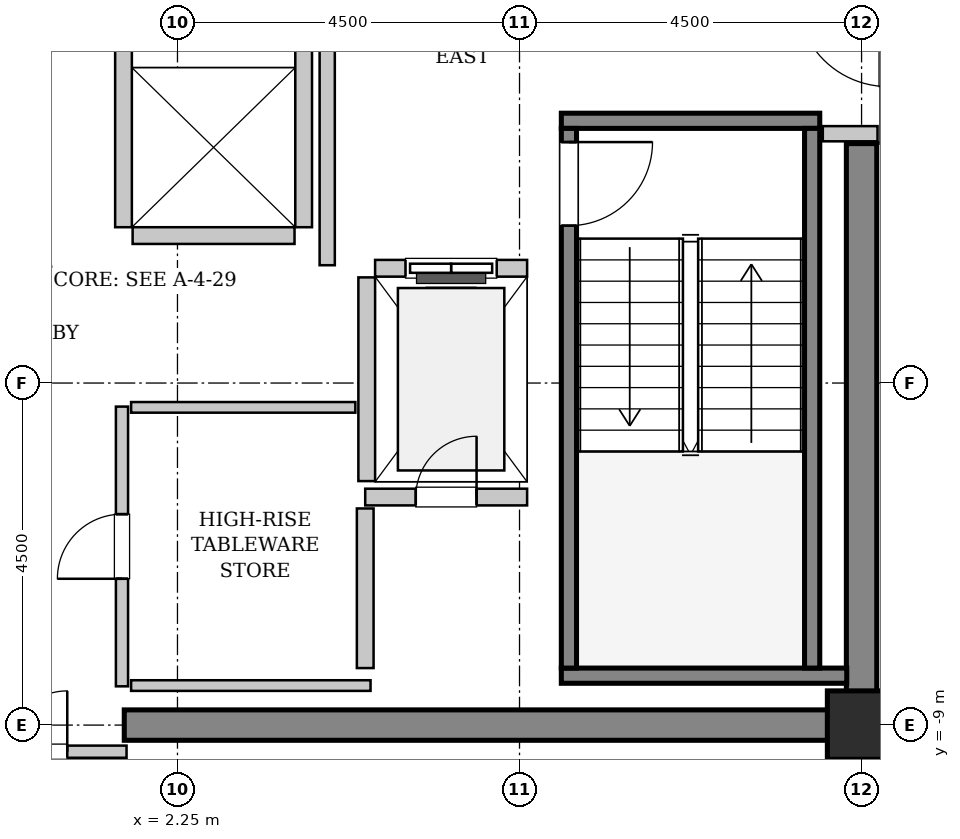
"""IFC4 building model, lengths in metres.
Left out: names, types, materials, properties, quantities, classifications, styles, units other than length and angle.
Written with IfcOpenShell. Run it as: python <this file> out.ifc"""

import sys

from ifc_helpers import new_model, si_unit, direction, frame, frame_2d, origin, origin_2d, place, context, subcontext, project, spatial, rectangle, extrude, source, transform, mapped, element, fill, save


model = new_model("IFC4")
c1 = context("Model", 3, precision=1e-05, world=origin(), true_north=direction((0.0, 1.0)))
c2 = subcontext(c1, "Body", "Model", "MODEL_VIEW")
j1 = project(units=[si_unit("LENGTHUNIT", "METRE"), si_unit("PLANEANGLEUNIT", "RADIAN")], contexts=[c1])
p1 = place(None, origin())
s1 = spatial("IfcSite", under=j1, at=p1, CompositionType="ELEMENT")
p2 = place(p1, origin())
s2 = spatial("IfcBuilding", under=s1, at=p2, CompositionType="ELEMENT")
p3 = place(p2, frame((0.0, 0.0, 333.8)))
s3 = spatial("IfcBuildingStorey", under=s2, at=p3, CompositionType="ELEMENT", Elevation=333.8)
m1 = source(origin(), c2, "Body", "SweptSolid", [
    extrude(rectangle(XDim=9.9, YDim=0.4, at=frame_2d((4.95, 0.0))), origin(), (0.0, 0.0, 1.0), 3.8),
])
p4 = place(p3, frame((1.55, -9.0, 0.0), z_axis=(0.0, 0.0, 1.0), x_axis=(1.0, 0.0, 0.0)))
e1 = element("IfcWall", 1, at=p4, inside=s3, PredefinedType="SHEAR", context=c2, shape_type="MappedRepresentation", body=[
    mapped(m1, transform((0.0, 0.0, 0.0), x_axis=(1.0, 0.0, 0.0), y_axis=(0.0, 1.0, 0.0), z_axis=(0.0, 0.0, 1.0), scale=1.0)),
])
m2 = source(origin(), c2, "Body", "SweptSolid", [
    extrude(rectangle(XDim=7.45, YDim=0.4, at=frame_2d((3.725, 0.0))), origin(), (0.0, 0.0, 1.0), 3.8),
])
p5 = place(p3, frame((11.25, -8.8, 0.0), z_axis=(0.0, 0.0, 1.0), x_axis=(0.0, 1.0, 0.0)))
e2 = element("IfcWall", 2, at=p5, inside=s3, PredefinedType="SHEAR", context=c2, shape_type="MappedRepresentation", body=[
    mapped(m2, transform((0.0, 0.0, 0.0), x_axis=(1.0, 0.0, 0.0), y_axis=(0.0, 1.0, 0.0), z_axis=(0.0, 0.0, 1.0), scale=1.0)),
])
m3 = source(origin(), c2, "Body", "SweptSolid", [
    extrude(rectangle(XDim=0.9, YDim=0.9, at=origin_2d()), origin(), (0.0, 0.0, 1.0), 3.8),
])
p6 = place(p3, frame((11.25, -9.0, 0.0), z_axis=(0.0, 0.0, 1.0), x_axis=(1.0, 0.0, 0.0)))
e3 = element("IfcColumn", 3, at=p6, inside=s3, PredefinedType="COLUMN", context=c2, shape_type="MappedRepresentation", body=[
    mapped(m3, transform((0.0, 0.0, 0.0), x_axis=(1.0, 0.0, 0.0), y_axis=(0.0, 1.0, 0.0), z_axis=(0.0, 0.0, 1.0), scale=1.0)),
])
m4 = source(origin(), c2, "Body", "SweptSolid", [
    extrude(rectangle(XDim=3.4, YDim=0.2, at=frame_2d((1.7, 0.0))), origin(), (0.0, 0.0, 1.0), 3.8),
])
p7 = place(p3, frame((7.3, -1.05, 0.0), z_axis=(0.0, 0.0, 1.0), x_axis=(1.0, 0.0, 0.0)))
e4 = element("IfcWall", 4, at=p7, inside=s3, PredefinedType="SOLIDWALL", context=c2, shape_type="MappedRepresentation", body=[
    mapped(m4, transform((0.0, 0.0, 0.0), x_axis=(1.0, 0.0, 0.0), y_axis=(0.0, 1.0, 0.0), z_axis=(0.0, 0.0, 1.0), scale=1.0)),
])
m5 = source(origin(), c2, "Body", "SweptSolid", [
    extrude(rectangle(XDim=3.755, YDim=0.2, at=frame_2d((1.877, 0.0))), origin(), (0.0, 0.0, 1.0), 3.8),
])
p8 = place(p3, frame((7.3, -8.35, 0.0), z_axis=(0.0, 0.0, 1.0), x_axis=(1.0, 0.0, 0.0)))
e5 = element("IfcWall", 5, at=p8, inside=s3, PredefinedType="SOLIDWALL", context=c2, shape_type="MappedRepresentation", body=[
    mapped(m5, transform((0.0, 0.0, 0.0), x_axis=(1.0, 0.0, 0.0), y_axis=(0.0, 1.0, 0.0), z_axis=(0.0, 0.0, 1.0), scale=1.0)),
])
m6 = source(origin(), c2, "Body", "SweptSolid", [
    extrude(rectangle(XDim=7.1, YDim=0.2, at=frame_2d((3.55, 0.0))), origin(), (0.0, 0.0, 1.0), 3.8),
])
p9 = place(p3, frame((7.4, -1.15, 0.0), z_axis=(0.0, 0.0, 1.0), x_axis=(0.0, -1.0, 0.0)))
e6 = element("IfcWall", 6, at=p9, inside=s3, PredefinedType="SOLIDWALL", context=c2, shape_type="MappedRepresentation", body=[
    mapped(m6, transform((0.0, 0.0, 0.0), x_axis=(1.0, 0.0, 0.0), y_axis=(0.0, 1.0, 0.0), z_axis=(0.0, 0.0, 1.0), scale=1.0)),
])
p10 = place(p9, frame((0.18, 0.0, 0.0)))
e7 = element("IfcOpeningElement", 7, at=p10, cuts=e6, PredefinedType="OPENING", context=c2, shape_type="SweptSolid", body=[
    extrude(rectangle(XDim=1.1, YDim=2.15, at=frame_2d((0.55, 1.075))), frame((0.0, 0.11, 0.0), z_axis=(0.0, -1.0, 0.0), x_axis=(1.0, 0.0, 0.0)), (0.0, 0.0, 1.0), 0.22),
])
p11 = place(p3, frame((10.6, -1.15, 0.0), z_axis=(0.0, 0.0, 1.0), x_axis=(0.0, -1.0, 0.0)))
e8 = element("IfcWall", 8, at=p11, inside=s3, PredefinedType="SOLIDWALL", context=c2, shape_type="MappedRepresentation", body=[
    mapped(m6, transform((0.0, 0.0, 0.0), x_axis=(1.0, 0.0, 0.0), y_axis=(0.0, 1.0, 0.0), z_axis=(0.0, 0.0, 1.0), scale=1.0)),
])
m7 = source(origin(), c2, "Body", "SweptSolid", [
    extrude(rectangle(XDim=2.0, YDim=0.22, at=frame_2d((1.0, 0.0))), origin(), (0.0, 0.0, 1.0), 3.535),
])
p12 = place(p3, frame((6.85, -2.99, 0.0), z_axis=(0.0, 0.0, 1.0), x_axis=(-1.0, 0.0, 0.0)))
e9 = element("IfcWall", 9, at=p12, inside=s3, PredefinedType="SOLIDWALL", context=c2, shape_type="MappedRepresentation", body=[
    mapped(m7, transform((0.0, 0.0, 0.0), x_axis=(1.0, 0.0, 0.0), y_axis=(0.0, 1.0, 0.0), z_axis=(0.0, 0.0, 1.0), scale=1.0)),
])
p13 = place(p12, frame((0.4, 0.0, 0.0)))
e10 = element("IfcOpeningElement", 10, at=p13, cuts=e9, PredefinedType="OPENING", context=c2, shape_type="SweptSolid", body=[
    extrude(rectangle(XDim=1.2, YDim=2.2, at=frame_2d((0.6, 1.1))), frame((0.0, 0.12, 0.0), z_axis=(0.0, -1.0, 0.0), x_axis=(1.0, 0.0, 0.0)), (0.0, 0.0, 1.0), 0.24),
])
m8 = source(origin(), c2, "Body", "SweptSolid", [
    extrude(rectangle(XDim=2.68, YDim=0.22, at=frame_2d((1.34, 0.0))), origin(), (0.0, 0.0, 1.0), 3.535),
])
p14 = place(p3, frame((4.74, -3.11, 0.0), z_axis=(0.0, 0.0, 1.0), x_axis=(0.0, -1.0, 0.0)))
e11 = element("IfcWall", 11, at=p14, inside=s3, PredefinedType="SOLIDWALL", context=c2, shape_type="MappedRepresentation", body=[
    mapped(m8, transform((0.0, 0.0, 0.0), x_axis=(1.0, 0.0, 0.0), y_axis=(0.0, 1.0, 0.0), z_axis=(0.0, 0.0, 1.0), scale=1.0)),
])
m9 = source(origin(), c2, "Body", "SweptSolid", [
    extrude(rectangle(XDim=4.9, YDim=0.22, at=frame_2d((2.45, 0.0))), origin(), (0.0, 0.0, 1.0), 3.535),
])
for number, where, z_axis, x_axis in (
    (12, (1.54, 2.45, 0.0), (0.0, 0.0, 1.0), (0.0, -1.0, 0.0)),
    (13, (3.91, -2.45, 0.0), (0.0, 0.0, 1.0), (0.0, 1.0, 0.0)),
):
    element("IfcWall", number, at=place(p3, frame(where, z_axis=z_axis, x_axis=x_axis)), inside=s3, PredefinedType="SOLIDWALL", context=c2, shape_type="MappedRepresentation", body=[
        mapped(m9, transform((0.0, 0.0, 0.0), x_axis=(1.0, 0.0, 0.0), y_axis=(0.0, 1.0, 0.0), z_axis=(0.0, 0.0, 1.0), scale=1.0)),
    ])
m10 = source(origin(), c2, "Body", "SweptSolid", [
    extrude(rectangle(XDim=2.13, YDim=0.22, at=frame_2d((1.065, 0.0))), origin(), (0.0, 0.0, 1.0), 3.535),
])
p15 = place(p3, frame((1.66, -2.56, 0.0), z_axis=(0.0, 0.0, 1.0), x_axis=(1.0, 0.0, 0.0)))
e14 = element("IfcWall", 14, at=p15, inside=s3, PredefinedType="SOLIDWALL", context=c2, shape_type="MappedRepresentation", body=[
    mapped(m10, transform((0.0, 0.0, 0.0), x_axis=(1.0, 0.0, 0.0), y_axis=(0.0, 1.0, 0.0), z_axis=(0.0, 0.0, 1.0), scale=1.0)),
])
p16 = place(p3, frame((4.72, -6.0, 0.0), z_axis=(0.0, 0.0, 1.0), x_axis=(1.0, 0.0, 0.0)))
e15 = element("IfcWall", 15, at=p16, inside=s3, PredefinedType="SOLIDWALL", context=c2, shape_type="MappedRepresentation", body=[
    mapped(m10, transform((0.0, 0.0, 0.0), x_axis=(1.0, 0.0, 0.0), y_axis=(0.0, 1.0, 0.0), z_axis=(0.0, 0.0, 1.0), scale=1.0)),
])
p17 = place(p16, frame((0.665, 0.0, 0.0)))
e16 = element("IfcOpeningElement", 16, at=p17, cuts=e15, PredefinedType="OPENING", context=c2, shape_type="SweptSolid", body=[
    extrude(rectangle(XDim=0.8, YDim=2.0, at=frame_2d((0.4, 1.0))), frame((0.0, 0.12, 0.0), z_axis=(0.0, -1.0, 0.0), x_axis=(1.0, 0.0, 0.0)), (0.0, 0.0, 1.0), 0.24),
])
m11 = source(origin(), c2, "Body", "SweptSolid", [
    extrude(rectangle(XDim=2.1, YDim=0.22, at=frame_2d((1.05, 0.0))), origin(), (0.0, 0.0, 1.0), 3.535),
])
p18 = place(p3, frame((4.72, -8.25, 0.0), z_axis=(0.0, 0.0, 1.0), x_axis=(0.0, 1.0, 0.0)))
e17 = element("IfcWall", 17, at=p18, inside=s3, PredefinedType="SOLIDWALL", context=c2, shape_type="MappedRepresentation", body=[
    mapped(m11, transform((0.0, 0.0, 0.0), x_axis=(1.0, 0.0, 0.0), y_axis=(0.0, 1.0, 0.0), z_axis=(0.0, 0.0, 1.0), scale=1.0)),
])
m12 = source(origin(), c2, "Body", "SweptSolid", [
    extrude(rectangle(XDim=5.9, YDim=0.2, at=frame_2d((2.95, 0.0))), origin(), (0.0, 0.0, 1.0), 3.535),
])
p19 = place(p3, frame((4.22, -2.95, 0.0), z_axis=(0.0, 0.0, 1.0), x_axis=(0.0, 1.0, 0.0)))
e18 = element("IfcWall", 18, at=p19, inside=s3, PredefinedType="PARTITIONING", context=c2, shape_type="MappedRepresentation", body=[
    mapped(m12, transform((0.0, 0.0, 0.0), x_axis=(1.0, 0.0, 0.0), y_axis=(0.0, 1.0, 0.0), z_axis=(0.0, 0.0, 1.0), scale=1.0)),
])
m13 = source(origin(), c2, "Body", "SweptSolid", [
    extrude(rectangle(XDim=0.72, YDim=0.2, at=frame_2d((0.36, 0.0))), origin(), (0.0, 0.0, 1.0), 3.535),
])
p20 = place(p3, frame((10.74, -1.22, 0.0), z_axis=(0.0, 0.0, 1.0), x_axis=(1.0, 0.0, 0.0)))
e19 = element("IfcWall", 19, at=p20, inside=s3, PredefinedType="PARTITIONING", context=c2, shape_type="MappedRepresentation", body=[
    mapped(m13, transform((0.0, 0.0, 0.0), x_axis=(1.0, 0.0, 0.0), y_axis=(0.0, 1.0, 0.0), z_axis=(0.0, 0.0, 1.0), scale=1.0)),
])
m14 = source(origin(), c2, "Body", "SweptSolid", [
    extrude(rectangle(XDim=3.16, YDim=0.16, at=frame_2d((1.58, 0.0))), origin(), (0.0, 0.0, 1.0), 2.625),
])
p21 = place(p3, frame((-1.58, -9.35, 0.0), z_axis=(0.0, 0.0, 1.0), x_axis=(1.0, 0.0, 0.0)))
e20 = element("IfcWall", 20, at=p21, inside=s3, PredefinedType="PARTITIONING", context=c2, shape_type="MappedRepresentation", body=[
    mapped(m14, transform((0.0, 0.0, 0.0), x_axis=(1.0, 0.0, 0.0), y_axis=(0.0, 1.0, 0.0), z_axis=(0.0, 0.0, 1.0), scale=1.0)),
])
p22 = place(p21, frame((0.78, 0.0, 0.0)))
e21 = element("IfcOpeningElement", 21, at=p22, cuts=e20, PredefinedType="OPENING", context=c2, shape_type="SweptSolid", body=[
    extrude(rectangle(XDim=1.6, YDim=2.3, at=frame_2d((0.8, 1.15))), frame((0.0, 0.09, 0.0), z_axis=(0.0, -1.0, 0.0), x_axis=(1.0, 0.0, 0.0)), (0.0, 0.0, 1.0), 0.18),
])
m15 = source(origin(), c2, "Body", "SweptSolid", [
    extrude(rectangle(XDim=3.68, YDim=0.16, at=frame_2d((1.84, 0.0))), origin(), (0.0, 0.0, 1.0), 3.535),
])
p23 = place(p3, frame((1.52, -8.49, 0.0), z_axis=(0.0, 0.0, 1.0), x_axis=(0.0, 1.0, 0.0)))
e22 = element("IfcWall", 22, at=p23, inside=s3, PredefinedType="PARTITIONING", context=c2, shape_type="MappedRepresentation", body=[
    mapped(m15, transform((0.0, 0.0, 0.0), x_axis=(1.0, 0.0, 0.0), y_axis=(0.0, 1.0, 0.0), z_axis=(0.0, 0.0, 1.0), scale=1.0)),
])
p24 = place(p23, frame((1.415, 0.0, 0.0)))
e23 = element("IfcOpeningElement", 23, at=p24, cuts=e22, PredefinedType="OPENING", context=c2, shape_type="SweptSolid", body=[
    extrude(rectangle(XDim=0.85, YDim=2.1, at=frame_2d((0.425, 1.05))), frame((0.0, 0.09, 0.0), z_axis=(0.0, -1.0, 0.0), x_axis=(1.0, 0.0, 0.0)), (0.0, 0.0, 1.0), 0.18),
])
m16 = source(origin(), c2, "Body", "SweptSolid", [
    extrude(rectangle(XDim=2.95, YDim=0.14, at=frame_2d((1.475, 0.0))), origin(), (0.0, 0.0, 1.0), 3.535),
])
p25 = place(p3, frame((1.64, -4.82, 0.0), z_axis=(0.0, 0.0, 1.0), x_axis=(1.0, 0.0, 0.0)))
e24 = element("IfcWall", 24, at=p25, inside=s3, PredefinedType="PARTITIONING", context=c2, shape_type="MappedRepresentation", body=[
    mapped(m16, transform((0.0, 0.0, 0.0), x_axis=(1.0, 0.0, 0.0), y_axis=(0.0, 1.0, 0.0), z_axis=(0.0, 0.0, 1.0), scale=1.0)),
])
m17 = source(origin(), c2, "Body", "SweptSolid", [
    extrude(rectangle(XDim=3.15, YDim=0.14, at=frame_2d((1.575, 0.0))), origin(), (0.0, 0.0, 1.0), 3.535),
])
p26 = place(p3, frame((1.64, -8.48, 0.0), z_axis=(0.0, 0.0, 1.0), x_axis=(1.0, 0.0, 0.0)))
e25 = element("IfcWall", 25, at=p26, inside=s3, PredefinedType="PARTITIONING", context=c2, shape_type="MappedRepresentation", body=[
    mapped(m17, transform((0.0, 0.0, 0.0), x_axis=(1.0, 0.0, 0.0), y_axis=(0.0, 1.0, 0.0), z_axis=(0.0, 0.0, 1.0), scale=1.0)),
])
m18 = source(origin(), c2, "Body", "SweptSolid", [
    extrude(rectangle(XDim=1.1, YDim=2.15, at=frame_2d((0.55, 1.075))), frame((0.0, 0.025, 0.0), z_axis=(0.0, -1.0, 0.0), x_axis=(1.0, 0.0, 0.0)), (0.0, 0.0, 1.0), 0.05),
])
p27 = place(p10, origin())
e26 = element("IfcDoor", 26, at=p27, inside=s3, OperationType="SINGLE_SWING_LEFT", PredefinedType="DOOR", context=c2, shape_type="MappedRepresentation", body=[
    mapped(m18, transform((0.0, 0.0, 0.0), x_axis=(1.0, 0.0, 0.0), y_axis=(0.0, 1.0, 0.0), z_axis=(0.0, 0.0, 1.0), scale=1.0)),
])
fill(e7, e26)
m19 = source(origin(), c2, "Body", "SweptSolid", [
    extrude(rectangle(XDim=1.2, YDim=2.2, at=frame_2d((0.6, 1.1))), frame((0.0, 0.025, 0.0), z_axis=(0.0, -1.0, 0.0), x_axis=(1.0, 0.0, 0.0)), (0.0, 0.0, 1.0), 0.05),
])
p28 = place(p13, origin())
e27 = element("IfcDoor", 27, at=p28, inside=s3, OperationType="SLIDING_TO_LEFT", PredefinedType="DOOR", context=c2, shape_type="MappedRepresentation", body=[
    mapped(m19, transform((0.0, 0.0, 0.0), x_axis=(1.0, 0.0, 0.0), y_axis=(0.0, 1.0, 0.0), z_axis=(0.0, 0.0, 1.0), scale=1.0)),
])
fill(e10, e27)
m20 = source(origin(), c2, "Body", "SweptSolid", [
    extrude(rectangle(XDim=0.8, YDim=2.0, at=frame_2d((0.4, 1.0))), frame((0.0, 0.025, 0.0), z_axis=(0.0, -1.0, 0.0), x_axis=(1.0, 0.0, 0.0)), (0.0, 0.0, 1.0), 0.05),
])
p29 = place(p17, origin())
e28 = element("IfcDoor", 28, at=p29, inside=s3, OperationType="SINGLE_SWING_RIGHT", PredefinedType="TRAPDOOR", context=c2, shape_type="MappedRepresentation", body=[
    mapped(m20, transform((0.0, 0.0, 0.0), x_axis=(1.0, 0.0, 0.0), y_axis=(0.0, 1.0, 0.0), z_axis=(0.0, 0.0, 1.0), scale=1.0)),
])
fill(e16, e28)
m21 = source(origin(), c2, "Body", "SweptSolid", [
    extrude(rectangle(XDim=1.6, YDim=2.3, at=frame_2d((0.8, 1.15))), frame((0.0, 0.025, 0.0), z_axis=(0.0, -1.0, 0.0), x_axis=(1.0, 0.0, 0.0)), (0.0, 0.0, 1.0), 0.05),
])
p30 = place(p22, origin())
e29 = element("IfcDoor", 29, at=p30, inside=s3, OperationType="DOUBLE_DOOR_SINGLE_SWING", PredefinedType="DOOR", context=c2, shape_type="MappedRepresentation", body=[
    mapped(m21, transform((0.0, 0.0, 0.0), x_axis=(1.0, 0.0, 0.0), y_axis=(0.0, 1.0, 0.0), z_axis=(0.0, 0.0, 1.0), scale=1.0)),
])
fill(e21, e29)
m22 = source(origin(), c2, "Body", "SweptSolid", [
    extrude(rectangle(XDim=0.85, YDim=2.1, at=frame_2d((0.425, 1.05))), frame((0.0, 0.025, 0.0), z_axis=(0.0, -1.0, 0.0), x_axis=(1.0, 0.0, 0.0)), (0.0, 0.0, 1.0), 0.05),
])
p31 = place(p24, origin())
e30 = element("IfcDoor", 30, at=p31, inside=s3, OperationType="SINGLE_SWING_LEFT", PredefinedType="DOOR", context=c2, shape_type="MappedRepresentation", body=[
    mapped(m22, transform((0.0, 0.0, 0.0), x_axis=(1.0, 0.0, 0.0), y_axis=(0.0, 1.0, 0.0), z_axis=(0.0, 0.0, 1.0), scale=1.0)),
])
fill(e23, e30)
save(model, sys.argv[1])
